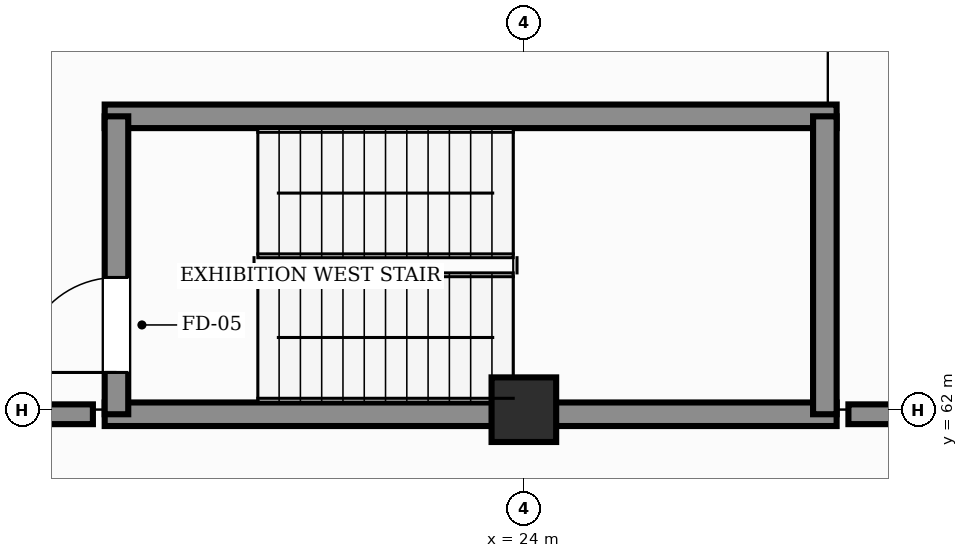
"""IFC4 building model, lengths in metres.
Left out: names, types, materials, properties, quantities, classifications, styles, units other than length and angle.
Written with IfcOpenShell. Run it as: python <this file> out.ifc"""

import sys

from ifc_helpers import new_model, si_unit, direction, frame, frame_2d, origin, origin_2d, place, context, subcontext, project, spatial, rectangle, extrude, element, fill, save


model = new_model("IFC4")
c1 = context("Model", 3, precision=1e-05, world=origin(), true_north=direction((0.0, 1.0)))
c2 = subcontext(c1, "Body", "Model", "MODEL_VIEW")
j1 = project(units=[si_unit("LENGTHUNIT", "METRE"), si_unit("PLANEANGLEUNIT", "RADIAN")], contexts=[c1])
p1 = place(None, origin())
s1 = spatial("IfcSite", under=j1, at=p1, CompositionType="ELEMENT")
p2 = place(p1, origin())
s2 = spatial("IfcBuilding", under=s1, at=p2, CompositionType="ELEMENT")
p3 = place(p2, frame((0.0, 0.0, -4.8)))
s3 = spatial("IfcBuildingStorey", under=s2, at=p3, CompositionType="ELEMENT", Elevation=-4.8)
p4 = place(p3, frame((24.0, 62.0, 0.0), z_axis=(0.0, 0.0, 1.0), x_axis=(1.0, 0.0, 0.0)))
e1 = element("IfcColumn", 1, at=p4, inside=s3, PredefinedType="COLUMN", context=c2, shape_type="SweptSolid", body=[
    extrude(rectangle(XDim=0.85, YDim=0.85, at=origin_2d()), origin(), (0.0, 0.0, 1.0), 4.8),
])
for number, where, z_axis, x_axis in (
    (2, (18.485, 61.94, 0.0), (0.0, 0.0, 1.0), (1.0, 0.0, 0.0)),
    (3, (18.485, 65.86, 0.0), (0.0, 0.0, 1.0), (1.0, 0.0, 0.0)),
):
    element("IfcWall", number, at=place(p3, frame(where, z_axis=z_axis, x_axis=x_axis)), inside=s3, PredefinedType="SHEAR", context=c2, shape_type="SweptSolid", body=[
        extrude(rectangle(XDim=9.63, YDim=0.31, at=frame_2d((4.815, 0.0))), origin(), (0.0, 0.0, 1.0), 4.8),
    ])
p5 = place(p3, frame((18.64, 61.94, 0.0), z_axis=(0.0, 0.0, 1.0), x_axis=(0.0, 1.0, 0.0)))
e4 = element("IfcWall", 4, at=p5, inside=s3, PredefinedType="SHEAR", context=c2, shape_type="SweptSolid", body=[
    extrude(rectangle(XDim=3.92, YDim=0.31, at=frame_2d((1.96, 0.0))), origin(), (0.0, 0.0, 1.0), 4.8),
])
p6 = place(p5, frame((0.55, 0.0, 0.0)))
e5 = element("IfcOpeningElement", 5, at=p6, cuts=e4, PredefinedType="OPENING", context=c2, shape_type="SweptSolid", body=[
    extrude(rectangle(XDim=1.25, YDim=2.2, at=frame_2d((0.625, 1.1))), frame((0.0, 0.165, 0.0), z_axis=(0.0, -1.0, 0.0), x_axis=(1.0, 0.0, 0.0)), (0.0, 0.0, 1.0), 0.33),
])
p7 = place(p3, frame((27.96, 61.94, 0.0), z_axis=(0.0, 0.0, 1.0), x_axis=(0.0, 1.0, 0.0)))
e6 = element("IfcWall", 6, at=p7, inside=s3, PredefinedType="SHEAR", context=c2, shape_type="SweptSolid", body=[
    extrude(rectangle(XDim=3.92, YDim=0.31, at=frame_2d((1.96, 0.0))), origin(), (0.0, 0.0, 1.0), 4.8),
])
p8 = place(p3, frame((8.4, 61.94, 0.0), z_axis=(0.0, 0.0, 1.0), x_axis=(1.0, 0.0, 0.0)))
e7 = element("IfcWall", 7, at=p8, inside=s3, PredefinedType="SOLIDWALL", context=c2, shape_type="SweptSolid", body=[
    extrude(rectangle(XDim=9.93, YDim=0.26, at=frame_2d((4.965, 0.0))), origin(), (0.0, 0.0, 1.0), 4.8),
])
p9 = place(p8, frame((3.5, 0.0, 0.0)))
e8 = element("IfcOpeningElement", 8, at=p9, cuts=e7, PredefinedType="OPENING", context=c2, shape_type="SweptSolid", body=[
    extrude(rectangle(XDim=2.1, YDim=2.4, at=frame_2d((1.05, 1.2))), frame((0.0, 0.14, 0.0), z_axis=(0.0, -1.0, 0.0), x_axis=(1.0, 0.0, 0.0)), (0.0, 0.0, 1.0), 0.28),
])
p10 = place(p3, frame((28.27, 61.94, 0.0), z_axis=(0.0, 0.0, 1.0), x_axis=(1.0, 0.0, 0.0)))
e9 = element("IfcWall", 9, at=p10, inside=s3, PredefinedType="SOLIDWALL", context=c2, shape_type="SweptSolid", body=[
    extrude(rectangle(XDim=111.06, YDim=0.26, at=frame_2d((55.53, 0.0))), origin(), (0.0, 0.0, 1.0), 4.8),
])
p11 = place(p10, frame((31.0, 0.0, 0.0)))
e10 = element("IfcOpeningElement", 10, at=p11, cuts=e9, PredefinedType="OPENING", context=c2, shape_type="SweptSolid", body=[
    extrude(rectangle(XDim=2.1, YDim=2.4, at=frame_2d((1.05, 1.2))), frame((0.0, 0.14, 0.0), z_axis=(0.0, -1.0, 0.0), x_axis=(1.0, 0.0, 0.0)), (0.0, 0.0, 1.0), 0.28),
])
p12 = place(p10, frame((71.0, 0.0, 0.0)))
e11 = element("IfcOpeningElement", 11, at=p12, cuts=e9, PredefinedType="OPENING", context=c2, shape_type="SweptSolid", body=[
    extrude(rectangle(XDim=2.1, YDim=2.4, at=frame_2d((1.05, 1.2))), frame((0.0, 0.14, 0.0), z_axis=(0.0, -1.0, 0.0), x_axis=(1.0, 0.0, 0.0)), (0.0, 0.0, 1.0), 0.28),
])
p13 = place(p10, frame((96.3, 0.0, 0.0)))
e12 = element("IfcOpeningElement", 12, at=p13, cuts=e9, PredefinedType="OPENING", context=c2, shape_type="SweptSolid", body=[
    extrude(rectangle(XDim=2.1, YDim=2.4, at=frame_2d((1.05, 1.2))), frame((0.0, 0.14, 0.0), z_axis=(0.0, -1.0, 0.0), x_axis=(1.0, 0.0, 0.0)), (0.0, 0.0, 1.0), 0.28),
])
p14 = place(p6, origin())
e13 = element("IfcDoor", 13, at=p14, inside=s3, OperationType="SINGLE_SWING_LEFT", PredefinedType="DOOR", context=c2, shape_type="SweptSolid", body=[
    extrude(rectangle(XDim=1.25, YDim=2.2, at=frame_2d((0.625, 1.1))), frame((0.0, 0.025, 0.0), z_axis=(0.0, -1.0, 0.0), x_axis=(1.0, 0.0, 0.0)), (0.0, 0.0, 1.0), 0.05),
])
fill(e5, e13)
save(model, sys.argv[1])
